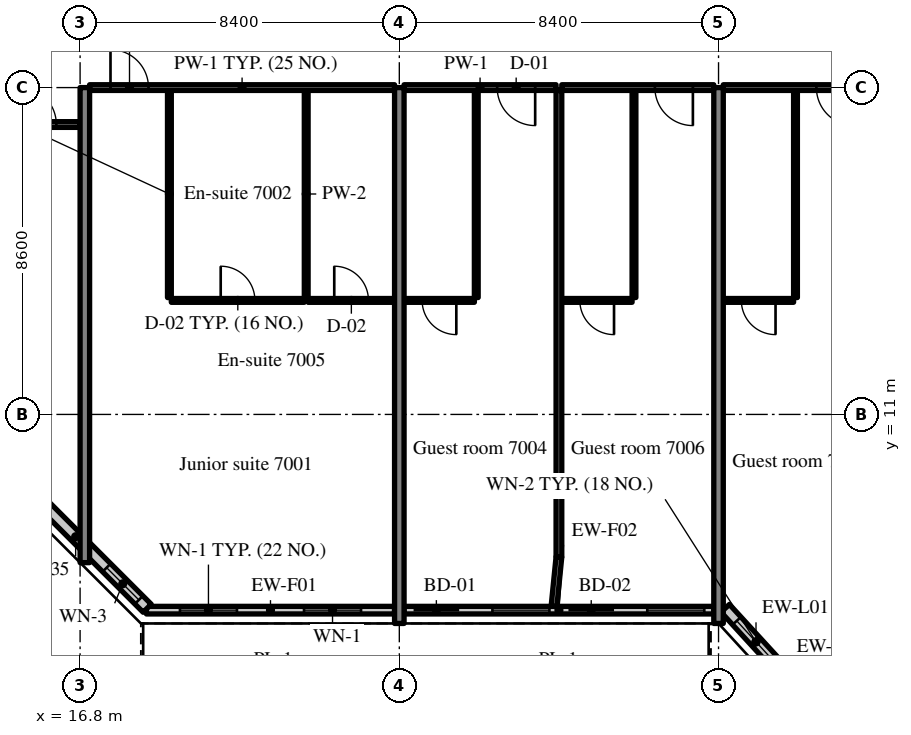
"""IFC4 building model, lengths in metres.
Left out: names, types, materials, properties, quantities, classifications, styles, units other than length and angle.
Written with IfcOpenShell. Run it as: python <this file> out.ifc"""

import sys

from ifc_helpers import new_model, si_unit, direction, frame, frame_2d, origin, place, context, subcontext, project, spatial, rectangle, extrude, source, transform, mapped, element, fill, save


model = new_model("IFC4")
c1 = context("Model", 3, precision=1e-05, world=origin(), true_north=direction((0.0, 1.0)))
c2 = subcontext(c1, "Body", "Model", "MODEL_VIEW")
j1 = project(units=[si_unit("LENGTHUNIT", "METRE"), si_unit("PLANEANGLEUNIT", "RADIAN")], contexts=[c1])
p1 = place(None, origin())
s1 = spatial("IfcSite", under=j1, at=p1, CompositionType="ELEMENT")
p2 = place(p1, origin())
s2 = spatial("IfcBuilding", under=s1, at=p2, CompositionType="ELEMENT")
p3 = place(p2, frame((0.0, 0.0, 293.7)))
s3 = spatial("IfcBuildingStorey", under=s2, at=p3, CompositionType="ELEMENT", Elevation=293.7)
m1 = source(origin(), c2, "Body", "SweptSolid", [
    extrude(rectangle(XDim=12.5, YDim=0.25, at=frame_2d((6.25, 0.0))), origin(), (0.0, 0.0, 1.0), 3.72),
])
p4 = place(p3, frame((16.925, 7.1, 0.0), z_axis=(0.0, 0.0, 1.0), x_axis=(0.0, 1.0, 0.0)))
e1 = element("IfcWall", 1, at=p4, inside=s3, PredefinedType="SHEAR", context=c2, shape_type="MappedRepresentation", body=[
    mapped(m1, transform((0.0, 0.0, 0.0), scale=1.0)),
])
m2 = source(origin(), c2, "Body", "SweptSolid", [
    extrude(rectangle(XDim=14.1, YDim=0.25, at=frame_2d((7.05, 0.0))), origin(), (0.0, 0.0, 1.0), 3.72),
])
for number, where, z_axis, x_axis in (
    (2, (25.2, 5.5, 0.0), (0.0, 0.0, 1.0), (0.0, 1.0, 0.0)),
    (3, (33.6, 5.5, 0.0), (0.0, 0.0, 1.0), (0.0, 1.0, 0.0)),
):
    element("IfcWall", number, at=place(p3, frame(where, z_axis=z_axis, x_axis=x_axis)), inside=s3, PredefinedType="SHEAR", context=c2, shape_type="MappedRepresentation", body=[
        mapped(m2, transform((0.0, 0.0, 0.0), scale=1.0)),
    ])
m3 = source(origin(), c2, "Body", "SweptSolid", [
    extrude(rectangle(XDim=6.53, YDim=0.2, at=frame_2d((3.265, 0.0))), origin(), (0.0, 0.0, 1.0), 3.17),
])
p5 = place(p3, frame((18.545, 5.85, 0.0), z_axis=(0.0, 0.0, 1.0), x_axis=(1.0, 0.0, 0.0)))
e4 = element("IfcWall", 4, at=p5, inside=s3, PredefinedType="SOLIDWALL", context=c2, shape_type="MappedRepresentation", body=[
    mapped(m3, transform((0.0, 0.0, 0.0), scale=1.0)),
])
m4 = source(origin(), c2, "Body", "SweptSolid", [
    extrude(rectangle(XDim=1.5, YDim=1.5, at=frame_2d((0.75, 0.75))), frame((0.0, 0.11, 0.0), z_axis=(0.0, -1.0, 0.0), x_axis=(1.0, 0.0, 0.0)), (0.0, 0.0, 1.0), 0.22),
])
p6 = place(p5, frame((0.883, 0.0, 0.9)))
e5 = element("IfcOpeningElement", 5, at=p6, cuts=e4, PredefinedType="OPENING", context=c2, shape_type="MappedRepresentation", body=[
    mapped(m4, transform((0.0, 0.0, 0.0), scale=1.0)),
])
p7 = place(p5, frame((4.147, 0.0, 0.9)))
e6 = element("IfcOpeningElement", 6, at=p7, cuts=e4, PredefinedType="OPENING", context=c2, shape_type="MappedRepresentation", body=[
    mapped(m4, transform((0.0, 0.0, 0.0), scale=1.0)),
])
m5 = source(origin(), c2, "Body", "SweptSolid", [
    extrude(rectangle(XDim=8.15, YDim=0.2, at=frame_2d((4.075, 0.0))), origin(), (0.0, 0.0, 1.0), 3.17),
])
p8 = place(p3, frame((25.325, 5.85, 0.0), z_axis=(0.0, 0.0, 1.0), x_axis=(1.0, 0.0, 0.0)))
e7 = element("IfcWall", 7, at=p8, inside=s3, PredefinedType="SOLIDWALL", context=c2, shape_type="MappedRepresentation", body=[
    mapped(m5, transform((0.0, 0.0, 0.0), scale=1.0)),
])
m6 = source(origin(), c2, "Body", "SweptSolid", [
    extrude(rectangle(XDim=1.2, YDim=2.4, at=frame_2d((0.6, 1.2))), frame((0.0, 0.11, 0.0), z_axis=(0.0, -1.0, 0.0), x_axis=(1.0, 0.0, 0.0)), (0.0, 0.0, 1.0), 0.22),
])
p9 = place(p8, frame((0.25, 0.0, 0.0)))
e8 = element("IfcOpeningElement", 8, at=p9, cuts=e7, PredefinedType="OPENING", context=c2, shape_type="MappedRepresentation", body=[
    mapped(m6, transform((0.0, 0.0, 0.0), scale=1.0)),
])
p10 = place(p8, frame((2.325, 0.0, 0.9)))
e9 = element("IfcOpeningElement", 9, at=p10, cuts=e7, PredefinedType="OPENING", context=c2, shape_type="MappedRepresentation", body=[
    mapped(m4, transform((0.0, 0.0, 0.0), scale=1.0)),
])
p11 = place(p8, frame((4.325, 0.0, 0.0)))
e10 = element("IfcOpeningElement", 10, at=p11, cuts=e7, PredefinedType="OPENING", context=c2, shape_type="MappedRepresentation", body=[
    mapped(m6, transform((0.0, 0.0, 0.0), scale=1.0)),
])
p12 = place(p8, frame((6.4, 0.0, 0.9)))
e11 = element("IfcOpeningElement", 11, at=p12, cuts=e7, PredefinedType="OPENING", context=c2, shape_type="MappedRepresentation", body=[
    mapped(m4, transform((0.0, 0.0, 0.0), scale=1.0)),
])
m7 = source(origin(), c2, "Body", "SweptSolid", [
    extrude(rectangle(XDim=2.398, YDim=0.3, at=frame_2d((1.199, 0.0))), origin(), (0.0, 0.0, 1.0), 3.72),
])
p13 = place(p3, frame((33.776, 5.9, 0.0), z_axis=(0.0, 0.0, 1.0), x_axis=(0.675374189419, -0.737475222815, 0.0)))
e12 = element("IfcWall", 12, at=p13, inside=s3, PredefinedType="SOLIDWALL", context=c2, shape_type="MappedRepresentation", body=[
    mapped(m7, transform((0.0, 0.0, 0.0), scale=1.0)),
])
m8 = source(origin(), c2, "Body", "SweptSolid", [
    extrude(rectangle(XDim=1.5, YDim=2.0, at=frame_2d((0.75, 1.0))), frame((0.0, 0.16, 0.0), z_axis=(0.0, -1.0, 0.0), x_axis=(1.0, 0.0, 0.0)), (0.0, 0.0, 1.0), 0.32),
])
p14 = place(p13, frame((0.449, 0.0, 0.9)))
e13 = element("IfcOpeningElement", 13, at=p14, cuts=e12, PredefinedType="OPENING", context=c2, shape_type="MappedRepresentation", body=[
    mapped(m8, transform((0.0, 0.0, 0.0), scale=1.0)),
])
m9 = source(origin(), c2, "Body", "SweptSolid", [
    extrude(rectangle(XDim=5.326, YDim=0.3, at=frame_2d((2.663, 0.0))), origin(), (0.0, 0.0, 1.0), 3.72),
])
p15 = place(p3, frame((14.8, 9.666, 0.0), z_axis=(0.0, 0.0, 1.0), x_axis=(0.707083859269, -0.707129702361, 0.0)))
e14 = element("IfcWall", 14, at=p15, inside=s3, PredefinedType="SOLIDWALL", context=c2, shape_type="MappedRepresentation", body=[
    mapped(m9, transform((0.0, 0.0, 0.0), scale=1.0)),
])
m10 = source(origin(), c2, "Body", "SweptSolid", [
    extrude(rectangle(XDim=1.2, YDim=1.5, at=frame_2d((0.6, 0.75))), frame((0.0, 0.16, 0.0), z_axis=(0.0, -1.0, 0.0), x_axis=(1.0, 0.0, 0.0)), (0.0, 0.0, 1.0), 0.32),
])
p16 = place(p15, frame((3.815, 0.0, 0.9)))
e15 = element("IfcOpeningElement", 15, at=p16, cuts=e14, PredefinedType="OPENING", context=c2, shape_type="MappedRepresentation", body=[
    mapped(m10, transform((0.0, 0.0, 0.0), scale=1.0)),
])
m11 = source(origin(), c2, "Body", "SweptSolid", [
    extrude(rectangle(XDim=5.45, YDim=0.1, at=frame_2d((2.725, 0.0))), origin(), (0.0, 0.0, 1.0), 3.72),
])
for number, where, z_axis, x_axis in (
    (16, (19.15, 14.075, 0.0), (0.0, 0.0, 1.0), (0.0, 1.0, 0.0)),
    (17, (22.75, 14.075, 0.0), (0.0, 0.0, 1.0), (0.0, 1.0, 0.0)),
):
    element("IfcWall", number, at=place(p3, frame(where, z_axis=z_axis, x_axis=x_axis)), inside=s3, PredefinedType="PARTITIONING", context=c2, shape_type="MappedRepresentation", body=[
        mapped(m11, transform((0.0, 0.0, 0.0), scale=1.0)),
    ])
m12 = source(origin(), c2, "Body", "SweptSolid", [
    extrude(rectangle(XDim=3.5, YDim=0.1, at=frame_2d((1.75, 0.0))), origin(), (0.0, 0.0, 1.0), 3.72),
])
p17 = place(p3, frame((19.2, 14.0, 0.0), z_axis=(0.0, 0.0, 1.0), x_axis=(1.0, 0.0, 0.0)))
e18 = element("IfcWall", 18, at=p17, inside=s3, PredefinedType="PARTITIONING", context=c2, shape_type="MappedRepresentation", body=[
    mapped(m12, transform((0.0, 0.0, 0.0), scale=1.0)),
])
m13 = source(origin(), c2, "Body", "SweptSolid", [
    extrude(rectangle(XDim=0.9, YDim=2.1, at=frame_2d((0.45, 1.05))), frame((0.0, 0.06, 0.0), z_axis=(0.0, -1.0, 0.0), x_axis=(1.0, 0.0, 0.0)), (0.0, 0.0, 1.0), 0.12),
])
p18 = place(p17, frame((1.3, 0.0, 0.0)))
e19 = element("IfcOpeningElement", 19, at=p18, cuts=e18, PredefinedType="OPENING", context=c2, shape_type="MappedRepresentation", body=[
    mapped(m13, transform((0.0, 0.0, 0.0), scale=1.0)),
])
m14 = source(origin(), c2, "Body", "SweptSolid", [
    extrude(rectangle(XDim=2.275, YDim=0.1, at=frame_2d((1.137, 0.0))), origin(), (0.0, 0.0, 1.0), 3.72),
])
p19 = place(p3, frame((22.8, 14.0, 0.0), z_axis=(0.0, 0.0, 1.0), x_axis=(1.0, 0.0, 0.0)))
e20 = element("IfcWall", 20, at=p19, inside=s3, PredefinedType="PARTITIONING", context=c2, shape_type="MappedRepresentation", body=[
    mapped(m14, transform((0.0, 0.0, 0.0), scale=1.0)),
])
p20 = place(p19, frame((0.688, 0.0, 0.0)))
e21 = element("IfcOpeningElement", 21, at=p20, cuts=e20, PredefinedType="OPENING", context=c2, shape_type="MappedRepresentation", body=[
    mapped(m13, transform((0.0, 0.0, 0.0), scale=1.0)),
])
m15 = source(origin(), c2, "Body", "SweptSolid", [
    extrude(rectangle(XDim=8.025, YDim=0.15, at=frame_2d((4.012, 0.0))), origin(), (0.0, 0.0, 1.0), 3.02),
])
p21 = place(p3, frame((17.05, 19.6, 0.0), z_axis=(0.0, 0.0, 1.0), x_axis=(1.0, 0.0, 0.0)))
e22 = element("IfcWall", 22, at=p21, inside=s3, PredefinedType="PARTITIONING", context=c2, shape_type="MappedRepresentation", body=[
    mapped(m15, transform((0.0, 0.0, 0.0), scale=1.0)),
])
m16 = source(origin(), c2, "Body", "SweptSolid", [
    extrude(rectangle(XDim=1.0, YDim=2.1, at=frame_2d((0.5, 1.05))), frame((0.0, 0.085, 0.0), z_axis=(0.0, -1.0, 0.0), x_axis=(1.0, 0.0, 0.0)), (0.0, 0.0, 1.0), 0.17),
])
p22 = place(p21, frame((0.55, 0.0, 0.0)))
e23 = element("IfcOpeningElement", 23, at=p22, cuts=e22, PredefinedType="OPENING", context=c2, shape_type="MappedRepresentation", body=[
    mapped(m16, transform((0.0, 0.0, 0.0), scale=1.0)),
])
p23 = place(p3, frame((27.225, 14.075, 0.0), z_axis=(0.0, 0.0, 1.0), x_axis=(0.0, 1.0, 0.0)))
e24 = element("IfcWall", 24, at=p23, inside=s3, PredefinedType="PARTITIONING", context=c2, shape_type="MappedRepresentation", body=[
    mapped(m11, transform((0.0, 0.0, 0.0), scale=1.0)),
])
m17 = source(origin(), c2, "Body", "SweptSolid", [
    extrude(rectangle(XDim=1.85, YDim=0.1, at=frame_2d((0.925, 0.0))), origin(), (0.0, 0.0, 1.0), 3.72),
])
p24 = place(p3, frame((25.325, 14.0, 0.0), z_axis=(0.0, 0.0, 1.0), x_axis=(1.0, 0.0, 0.0)))
e25 = element("IfcWall", 25, at=p24, inside=s3, PredefinedType="PARTITIONING", context=c2, shape_type="MappedRepresentation", body=[
    mapped(m17, transform((0.0, 0.0, 0.0), scale=1.0)),
])
p25 = place(p24, frame((0.475, 0.0, 0.0)))
e26 = element("IfcOpeningElement", 26, at=p25, cuts=e25, PredefinedType="OPENING", context=c2, shape_type="MappedRepresentation", body=[
    mapped(m13, transform((0.0, 0.0, 0.0), scale=1.0)),
])
m18 = source(origin(), c2, "Body", "SweptSolid", [
    extrude(rectangle(XDim=4.0, YDim=0.15, at=frame_2d((2.0, 0.0))), origin(), (0.0, 0.0, 1.0), 3.02),
])
p26 = place(p3, frame((25.325, 19.6, 0.0), z_axis=(0.0, 0.0, 1.0), x_axis=(1.0, 0.0, 0.0)))
e27 = element("IfcWall", 27, at=p26, inside=s3, PredefinedType="PARTITIONING", context=c2, shape_type="MappedRepresentation", body=[
    mapped(m18, transform((0.0, 0.0, 0.0), scale=1.0)),
])
p27 = place(p26, frame((2.45, 0.0, 0.0)))
e28 = element("IfcOpeningElement", 28, at=p27, cuts=e27, PredefinedType="OPENING", context=c2, shape_type="MappedRepresentation", body=[
    mapped(m16, transform((0.0, 0.0, 0.0), scale=1.0)),
])
p28 = place(p3, frame((31.375, 14.075, 0.0), z_axis=(0.0, 0.0, 1.0), x_axis=(0.0, 1.0, 0.0)))
e29 = element("IfcWall", 29, at=p28, inside=s3, PredefinedType="PARTITIONING", context=c2, shape_type="MappedRepresentation", body=[
    mapped(m11, transform((0.0, 0.0, 0.0), scale=1.0)),
])
m19 = source(origin(), c2, "Body", "SweptSolid", [
    extrude(rectangle(XDim=1.85, YDim=0.1, at=frame_2d((0.925, 0.0))), origin(), (0.0, 0.0, 1.0), 3.72),
])
p29 = place(p3, frame((29.475, 14.0, 0.0), z_axis=(0.0, 0.0, 1.0), x_axis=(1.0, 0.0, 0.0)))
e30 = element("IfcWall", 30, at=p29, inside=s3, PredefinedType="PARTITIONING", context=c2, shape_type="MappedRepresentation", body=[
    mapped(m19, transform((0.0, 0.0, 0.0), scale=1.0)),
])
p30 = place(p29, frame((0.475, 0.0, 0.0)))
e31 = element("IfcOpeningElement", 31, at=p30, cuts=e30, PredefinedType="OPENING", context=c2, shape_type="MappedRepresentation", body=[
    mapped(m13, transform((0.0, 0.0, 0.0), scale=1.0)),
])
p31 = place(p3, frame((29.475, 19.6, 0.0), z_axis=(0.0, 0.0, 1.0), x_axis=(1.0, 0.0, 0.0)))
e32 = element("IfcWall", 32, at=p31, inside=s3, PredefinedType="PARTITIONING", context=c2, shape_type="MappedRepresentation", body=[
    mapped(m18, transform((0.0, 0.0, 0.0), scale=1.0)),
])
p32 = place(p31, frame((2.45, 0.0, 0.0)))
e33 = element("IfcOpeningElement", 33, at=p32, cuts=e32, PredefinedType="OPENING", context=c2, shape_type="MappedRepresentation", body=[
    mapped(m16, transform((0.0, 0.0, 0.0), scale=1.0)),
])
m20 = source(origin(), c2, "Body", "SweptSolid", [
    extrude(rectangle(XDim=12.275, YDim=0.15, at=frame_2d((6.137, 0.0))), origin(), (0.0, 0.0, 1.0), 3.72),
])
p33 = place(p3, frame((29.4, 7.25, 0.0), z_axis=(0.0, 0.0, 1.0), x_axis=(0.0, 1.0, 0.0)))
e34 = element("IfcWall", 34, at=p33, inside=s3, PredefinedType="PARTITIONING", context=c2, shape_type="MappedRepresentation", body=[
    mapped(m20, transform((0.0, 0.0, 0.0), scale=1.0)),
])
p34 = place(p3, frame((35.625, 14.075, 0.0), z_axis=(0.0, 0.0, 1.0), x_axis=(0.0, 1.0, 0.0)))
e35 = element("IfcWall", 35, at=p34, inside=s3, PredefinedType="PARTITIONING", context=c2, shape_type="MappedRepresentation", body=[
    mapped(m11, transform((0.0, 0.0, 0.0), scale=1.0)),
])
p35 = place(p3, frame((33.725, 14.0, 0.0), z_axis=(0.0, 0.0, 1.0), x_axis=(1.0, 0.0, 0.0)))
e36 = element("IfcWall", 36, at=p35, inside=s3, PredefinedType="PARTITIONING", context=c2, shape_type="MappedRepresentation", body=[
    mapped(m19, transform((0.0, 0.0, 0.0), scale=1.0)),
])
p36 = place(p35, frame((0.475, 0.0, 0.0)))
e37 = element("IfcOpeningElement", 37, at=p36, cuts=e36, PredefinedType="OPENING", context=c2, shape_type="MappedRepresentation", body=[
    mapped(m13, transform((0.0, 0.0, 0.0), scale=1.0)),
])
p37 = place(p3, frame((33.725, 19.6, 0.0), z_axis=(0.0, 0.0, 1.0), x_axis=(1.0, 0.0, 0.0)))
e38 = element("IfcWall", 38, at=p37, inside=s3, PredefinedType="PARTITIONING", context=c2, shape_type="MappedRepresentation", body=[
    mapped(m18, transform((0.0, 0.0, 0.0), scale=1.0)),
])
p38 = place(p37, frame((2.45, 0.0, 0.0)))
e39 = element("IfcOpeningElement", 39, at=p38, cuts=e38, PredefinedType="OPENING", context=c2, shape_type="MappedRepresentation", body=[
    mapped(m16, transform((0.0, 0.0, 0.0), scale=1.0)),
])
m21 = source(origin(), c2, "Body", "SweptSolid", [
    extrude(rectangle(XDim=1.9, YDim=0.15, at=frame_2d((0.95, 0.0))), origin(), (0.0, 0.0, 1.0), 3.02),
])
p39 = place(p3, frame((14.9, 18.628, 0.0), z_axis=(0.0, 0.0, 1.0), x_axis=(1.0, 0.0, 0.0)))
e40 = element("IfcWall", 40, at=p39, inside=s3, PredefinedType="PARTITIONING", context=c2, shape_type="MappedRepresentation", body=[
    mapped(m21, transform((0.0, 0.0, 0.0), scale=1.0)),
])
p40 = place(p39, frame((0.275, 0.0, 0.0)))
e41 = element("IfcOpeningElement", 41, at=p40, cuts=e40, PredefinedType="OPENING", context=c2, shape_type="MappedRepresentation", body=[
    mapped(m16, transform((0.0, 0.0, 0.0), scale=1.0)),
])
m22 = source(origin(), c2, "Body", "SweptSolid", [
    extrude(rectangle(XDim=1.307, YDim=0.15, at=frame_2d((0.653, 0.0))), origin(), (0.0, 0.0, 1.0), 3.72),
])
p41 = place(p3, frame((29.27, 5.95, 0.0), z_axis=(0.0, 0.0, 1.0), x_axis=(0.099411212066, 0.995046436562, 0.0)))
e42 = element("IfcWall", 42, at=p41, inside=s3, PredefinedType="PARTITIONING", context=c2, shape_type="MappedRepresentation", body=[
    mapped(m22, transform((0.0, 0.0, 0.0), scale=1.0)),
])
m23 = source(origin(), c2, "Body", "SweptSolid", [
    extrude(rectangle(XDim=1.5, YDim=1.5, at=frame_2d((0.75, 0.75))), frame((0.0, 0.03, 0.0), z_axis=(0.0, -1.0, 0.0), x_axis=(1.0, 0.0, 0.0)), (0.0, 0.0, 1.0), 0.06),
])
p42 = place(p6, origin())
e43 = element("IfcWindow", 43, at=p42, inside=s3, PartitioningType="SINGLE_PANEL", PredefinedType="WINDOW", context=c2, shape_type="MappedRepresentation", body=[
    mapped(m23, transform((0.0, 0.0, 0.0), scale=1.0)),
])
fill(e5, e43)
p43 = place(p7, origin())
e44 = element("IfcWindow", 44, at=p43, inside=s3, PartitioningType="SINGLE_PANEL", PredefinedType="WINDOW", context=c2, shape_type="MappedRepresentation", body=[
    mapped(m23, transform((0.0, 0.0, 0.0), scale=1.0)),
])
fill(e6, e44)
m24 = source(origin(), c2, "Body", "SweptSolid", [
    extrude(rectangle(XDim=1.2, YDim=2.4, at=frame_2d((0.6, 1.2))), frame((0.0, 0.025, 0.0), z_axis=(0.0, -1.0, 0.0), x_axis=(1.0, 0.0, 0.0)), (0.0, 0.0, 1.0), 0.05),
])
p44 = place(p9, origin())
e45 = element("IfcDoor", 45, at=p44, inside=s3, OperationType="SLIDING_TO_LEFT", PredefinedType="DOOR", context=c2, shape_type="MappedRepresentation", body=[
    mapped(m24, transform((0.0, 0.0, 0.0), scale=1.0)),
])
fill(e8, e45)
p45 = place(p10, origin())
e46 = element("IfcWindow", 46, at=p45, inside=s3, PartitioningType="SINGLE_PANEL", PredefinedType="WINDOW", context=c2, shape_type="MappedRepresentation", body=[
    mapped(m23, transform((0.0, 0.0, 0.0), scale=1.0)),
])
fill(e9, e46)
p46 = place(p11, origin())
e47 = element("IfcDoor", 47, at=p46, inside=s3, OperationType="SLIDING_TO_RIGHT", PredefinedType="DOOR", context=c2, shape_type="MappedRepresentation", body=[
    mapped(m24, transform((0.0, 0.0, 0.0), scale=1.0)),
])
fill(e10, e47)
p47 = place(p12, origin())
e48 = element("IfcWindow", 48, at=p47, inside=s3, PartitioningType="SINGLE_PANEL", PredefinedType="WINDOW", context=c2, shape_type="MappedRepresentation", body=[
    mapped(m23, transform((0.0, 0.0, 0.0), scale=1.0)),
])
fill(e11, e48)
m25 = source(origin(), c2, "Body", "SweptSolid", [
    extrude(rectangle(XDim=1.5, YDim=2.0, at=frame_2d((0.75, 1.0))), frame((0.0, 0.03, 0.0), z_axis=(0.0, -1.0, 0.0), x_axis=(1.0, 0.0, 0.0)), (0.0, 0.0, 1.0), 0.06),
])
p48 = place(p14, origin())
e49 = element("IfcWindow", 49, at=p48, inside=s3, PartitioningType="SINGLE_PANEL", PredefinedType="WINDOW", context=c2, shape_type="MappedRepresentation", body=[
    mapped(m25, transform((0.0, 0.0, 0.0), scale=1.0)),
])
fill(e13, e49)
m26 = source(origin(), c2, "Body", "SweptSolid", [
    extrude(rectangle(XDim=1.2, YDim=1.5, at=frame_2d((0.6, 0.75))), frame((0.0, 0.03, 0.0), z_axis=(0.0, -1.0, 0.0), x_axis=(1.0, 0.0, 0.0)), (0.0, 0.0, 1.0), 0.06),
])
p49 = place(p16, origin())
e50 = element("IfcWindow", 50, at=p49, inside=s3, PartitioningType="SINGLE_PANEL", PredefinedType="WINDOW", context=c2, shape_type="MappedRepresentation", body=[
    mapped(m26, transform((0.0, 0.0, 0.0), scale=1.0)),
])
fill(e15, e50)
m27 = source(origin(), c2, "Body", "SweptSolid", [
    extrude(rectangle(XDim=0.9, YDim=2.1, at=frame_2d((0.45, 1.05))), frame((0.0, 0.025, 0.0), z_axis=(0.0, -1.0, 0.0), x_axis=(1.0, 0.0, 0.0)), (0.0, 0.0, 1.0), 0.05),
])
p50 = place(p18, origin())
e51 = element("IfcDoor", 51, at=p50, inside=s3, OperationType="SINGLE_SWING_LEFT", PredefinedType="DOOR", context=c2, shape_type="MappedRepresentation", body=[
    mapped(m27, transform((0.0, 0.0, 0.0), scale=1.0)),
])
fill(e19, e51)
p51 = place(p20, origin())
e52 = element("IfcDoor", 52, at=p51, inside=s3, OperationType="SINGLE_SWING_LEFT", PredefinedType="DOOR", context=c2, shape_type="MappedRepresentation", body=[
    mapped(m27, transform((0.0, 0.0, 0.0), scale=1.0)),
])
fill(e21, e52)
m28 = source(origin(), c2, "Body", "SweptSolid", [
    extrude(rectangle(XDim=1.0, YDim=2.1, at=frame_2d((0.5, 1.05))), frame((0.0, 0.025, 0.0), z_axis=(0.0, -1.0, 0.0), x_axis=(1.0, 0.0, 0.0)), (0.0, 0.0, 1.0), 0.05),
])
p52 = place(p22, origin())
e53 = element("IfcDoor", 53, at=p52, inside=s3, OperationType="SINGLE_SWING_LEFT", PredefinedType="DOOR", context=c2, shape_type="MappedRepresentation", body=[
    mapped(m28, transform((0.0, 0.0, 0.0), scale=1.0)),
])
fill(e23, e53)
p53 = place(p25, origin())
e54 = element("IfcDoor", 54, at=p53, inside=s3, OperationType="SINGLE_SWING_RIGHT", PredefinedType="DOOR", context=c2, shape_type="MappedRepresentation", body=[
    mapped(m27, transform((0.0, 0.0, 0.0), scale=1.0)),
])
fill(e26, e54)
p54 = place(p27, origin())
e55 = element("IfcDoor", 55, at=p54, inside=s3, OperationType="SINGLE_SWING_RIGHT", PredefinedType="DOOR", context=c2, shape_type="MappedRepresentation", body=[
    mapped(m28, transform((0.0, 0.0, 0.0), scale=1.0)),
])
fill(e28, e55)
p55 = place(p30, origin())
e56 = element("IfcDoor", 56, at=p55, inside=s3, OperationType="SINGLE_SWING_RIGHT", PredefinedType="DOOR", context=c2, shape_type="MappedRepresentation", body=[
    mapped(m27, transform((0.0, 0.0, 0.0), scale=1.0)),
])
fill(e31, e56)
p56 = place(p32, origin())
e57 = element("IfcDoor", 57, at=p56, inside=s3, OperationType="SINGLE_SWING_RIGHT", PredefinedType="DOOR", context=c2, shape_type="MappedRepresentation", body=[
    mapped(m28, transform((0.0, 0.0, 0.0), scale=1.0)),
])
fill(e33, e57)
p57 = place(p36, origin())
e58 = element("IfcDoor", 58, at=p57, inside=s3, OperationType="SINGLE_SWING_RIGHT", PredefinedType="DOOR", context=c2, shape_type="MappedRepresentation", body=[
    mapped(m27, transform((0.0, 0.0, 0.0), scale=1.0)),
])
fill(e37, e58)
p58 = place(p38, origin())
e59 = element("IfcDoor", 59, at=p58, inside=s3, OperationType="SINGLE_SWING_RIGHT", PredefinedType="DOOR", context=c2, shape_type="MappedRepresentation", body=[
    mapped(m28, transform((0.0, 0.0, 0.0), scale=1.0)),
])
fill(e39, e59)
p59 = place(p40, origin())
e60 = element("IfcDoor", 60, at=p59, inside=s3, OperationType="SINGLE_SWING_LEFT", PredefinedType="DOOR", context=c2, shape_type="MappedRepresentation", body=[
    mapped(m28, transform((0.0, 0.0, 0.0), scale=1.0)),
])
fill(e41, e60)
save(model, sys.argv[1])
